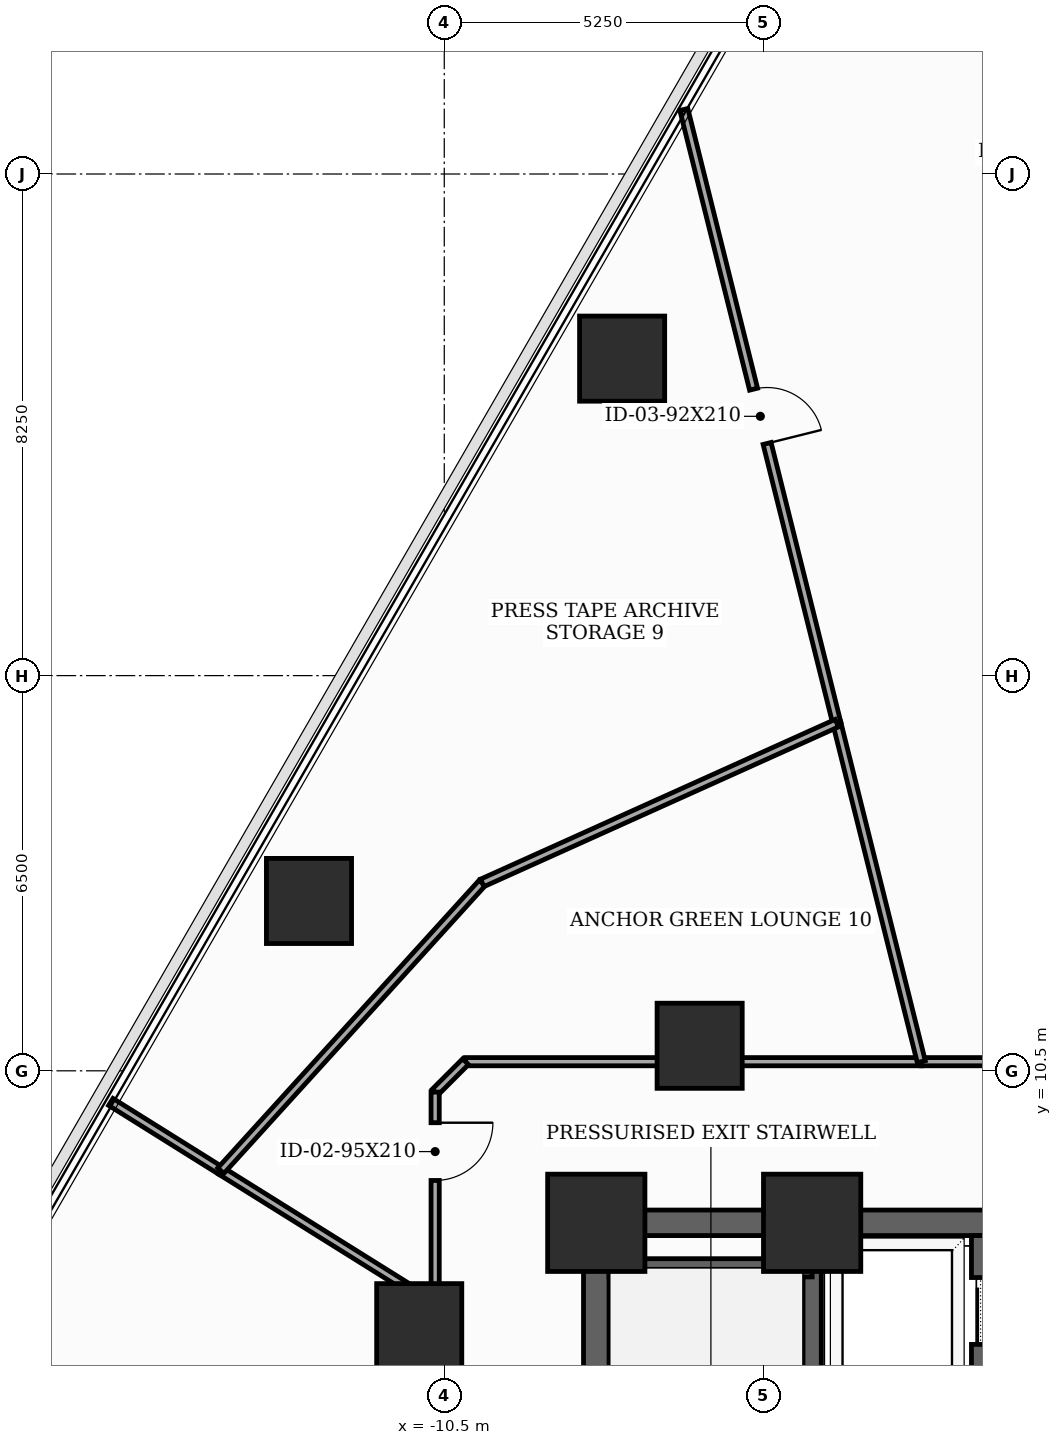
"""IFC4 building model, lengths in metres.
Left out: names, types, materials, properties, quantities, classifications, styles, units other than length and angle.
Written with IfcOpenShell. Run it as: python <this file> out.ifc"""

import sys

from ifc_helpers import new_model, si_unit, direction, frame, frame_2d, origin, origin_2d, place, context, subcontext, project, spatial, rectangle, extrude, element, fill, save


model = new_model("IFC4")
c1 = context("Model", 3, precision=1e-05, world=origin(), true_north=direction((0.0, 1.0)))
c2 = subcontext(c1, "Body", "Model", "MODEL_VIEW")
j1 = project(units=[si_unit("LENGTHUNIT", "METRE"), si_unit("PLANEANGLEUNIT", "RADIAN")], contexts=[c1])
p1 = place(None, origin())
s1 = spatial("IfcSite", under=j1, at=p1, CompositionType="ELEMENT")
p2 = place(p1, origin())
s2 = spatial("IfcBuilding", under=s1, at=p2, CompositionType="ELEMENT")
p3 = place(p2, frame((0.0, 0.0, 33.4)))
s3 = spatial("IfcBuildingStorey", under=s2, at=p3, CompositionType="ELEMENT", Elevation=33.4)
for number, where, z_axis, x_axis in (
    (1, (-4.45, 8.0, 0.0), (0.0, 0.0, 1.0), (1.0, 0.0, 0.0)),
    (2, (-8.0, 8.0, 0.0), (0.0, 0.0, 1.0), (1.0, 0.0, 0.0)),
):
    element("IfcColumn", number, at=place(p3, frame(where, z_axis=z_axis, x_axis=x_axis)), inside=s3, PredefinedType="COLUMN", context=c2, shape_type="SweptSolid", body=[
        extrude(rectangle(XDim=1.6, YDim=1.6, at=origin_2d()), origin(), (0.0, 0.0, 1.0), 3.7),
    ])
for number, where, z_axis, x_axis in (
    (3, (-6.3, 10.912, 0.0), (0.0, 0.0, 1.0), (1.0, 0.0, 0.0)),
    (4, (-10.912, 6.3, 0.0), (0.0, 0.0, 1.0), (1.0, 0.0, 0.0)),
    (5, (-7.575, 22.213, 0.0), (0.0, 0.0, 1.0), (1.0, 0.0, 0.0)),
    (6, (-12.725, 13.293, 0.0), (0.0, 0.0, 1.0), (1.0, 0.0, 0.0)),
):
    element("IfcColumn", number, at=place(p3, frame(where, z_axis=z_axis, x_axis=x_axis)), inside=s3, PredefinedType="COLUMN", context=c2, shape_type="SweptSolid", body=[
        extrude(rectangle(XDim=1.4, YDim=1.4, at=origin_2d()), origin(), (0.0, 0.0, 1.0), 3.7),
    ])
p4 = place(p3, frame((-8.0, -8.0, 0.0), z_axis=(0.0, 0.0, 1.0), x_axis=(0.0, 1.0, 0.0)))
e7 = element("IfcWall", 7, at=p4, inside=s3, PredefinedType="SHEAR", context=c2, shape_type="SweptSolid", body=[
    extrude(rectangle(XDim=16.0, YDim=0.42, at=frame_2d((8.0, 0.0))), origin(), (0.0, 0.0, 1.0), 3.5),
])
p5 = place(p4, frame((1.002, 0.0, 0.0)))
e8 = element("IfcOpeningElement", 8, at=p5, cuts=e7, PredefinedType="OPENING", context=c2, shape_type="SweptSolid", body=[
    extrude(rectangle(XDim=0.85, YDim=2.02, at=frame_2d((0.425, 1.01))), frame((0.0, 0.22, 0.0), z_axis=(0.0, -1.0, 0.0), x_axis=(1.0, 0.0, 0.0)), (0.0, 0.0, 1.0), 0.44),
])
p6 = place(p4, frame((5.35, 0.0, 0.0)))
e9 = element("IfcOpeningElement", 9, at=p6, cuts=e7, PredefinedType="OPENING", context=c2, shape_type="SweptSolid", body=[
    extrude(rectangle(XDim=1.05, YDim=2.15, at=frame_2d((0.525, 1.075))), frame((0.0, 0.22, 0.0), z_axis=(0.0, -1.0, 0.0), x_axis=(1.0, 0.0, 0.0)), (0.0, 0.0, 1.0), 0.44),
])
p7 = place(p3, frame((-8.0, 8.0, 0.0), z_axis=(0.0, 0.0, 1.0), x_axis=(1.0, 0.0, 0.0)))
e10 = element("IfcWall", 10, at=p7, inside=s3, PredefinedType="SHEAR", context=c2, shape_type="SweptSolid", body=[
    extrude(rectangle(XDim=16.0, YDim=0.42, at=frame_2d((8.0, 0.0))), origin(), (0.0, 0.0, 1.0), 3.5),
])
p8 = place(p7, frame((7.1, 0.0, 0.0)))
e11 = element("IfcOpeningElement", 11, at=p8, cuts=e10, PredefinedType="OPENING", context=c2, shape_type="SweptSolid", body=[
    extrude(rectangle(XDim=1.8, YDim=2.15, at=frame_2d((0.9, 1.075))), frame((0.0, 0.22, 0.0), z_axis=(0.0, -1.0, 0.0), x_axis=(1.0, 0.0, 0.0)), (0.0, 0.0, 1.0), 0.44),
])
p9 = place(p3, frame((-4.45, -7.79, 0.0), z_axis=(0.0, 0.0, 1.0), x_axis=(0.0, 1.0, 0.0)))
e12 = element("IfcWall", 12, at=p9, inside=s3, PredefinedType="SHEAR", context=c2, shape_type="SweptSolid", body=[
    extrude(rectangle(XDim=15.58, YDim=0.3, at=frame_2d((7.79, 0.0))), origin(), (0.0, 0.0, 1.0), 3.5),
])
p10 = place(p3, frame((-7.79, 7.26, 0.0), z_axis=(0.0, 0.0, 1.0), x_axis=(1.0, 0.0, 0.0)))
e13 = element("IfcWall", 13, at=p10, inside=s3, PredefinedType="SHEAR", context=c2, shape_type="SweptSolid", body=[
    extrude(rectangle(XDim=3.34, YDim=0.3, at=frame_2d((1.67, 0.0))), origin(), (0.0, 0.0, 1.0), 3.5),
])
p11 = place(p3, frame((-1.68, -4.85, 0.0), z_axis=(0.0, 0.0, 1.0), x_axis=(0.0, 1.0, 0.0)))
e14 = element("IfcWall", 14, at=p11, inside=s3, PredefinedType="SHEAR", context=c2, shape_type="SweptSolid", body=[
    extrude(rectangle(XDim=12.64, YDim=0.3, at=frame_2d((6.32, 0.0))), origin(), (0.0, 0.0, 1.0), 3.5),
])
p12 = place(p11, frame((3.95, 0.0, 0.0)))
e15 = element("IfcOpeningElement", 15, at=p12, cuts=e14, PredefinedType="OPENING", context=c2, shape_type="SweptSolid", body=[
    extrude(rectangle(XDim=1.1, YDim=2.1, at=frame_2d((0.55, 1.05))), frame((0.0, 0.16, 0.0), z_axis=(0.0, -1.0, 0.0), x_axis=(1.0, 0.0, 0.0)), (0.0, 0.0, 1.0), 0.32),
])
p13 = place(p11, frame((6.25, 0.0, 0.0)))
e16 = element("IfcOpeningElement", 16, at=p13, cuts=e14, PredefinedType="OPENING", context=c2, shape_type="SweptSolid", body=[
    extrude(rectangle(XDim=1.1, YDim=2.1, at=frame_2d((0.55, 1.05))), frame((0.0, 0.16, 0.0), z_axis=(0.0, -1.0, 0.0), x_axis=(1.0, 0.0, 0.0)), (0.0, 0.0, 1.0), 0.32),
])
p14 = place(p11, frame((8.55, 0.0, 0.0)))
e17 = element("IfcOpeningElement", 17, at=p14, cuts=e14, PredefinedType="OPENING", context=c2, shape_type="SweptSolid", body=[
    extrude(rectangle(XDim=1.1, YDim=2.1, at=frame_2d((0.55, 1.05))), frame((0.0, 0.16, 0.0), z_axis=(0.0, -1.0, 0.0), x_axis=(1.0, 0.0, 0.0)), (0.0, 0.0, 1.0), 0.32),
])
p15 = place(p11, frame((10.85, 0.0, 0.0)))
e18 = element("IfcOpeningElement", 18, at=p15, cuts=e14, PredefinedType="OPENING", context=c2, shape_type="SweptSolid", body=[
    extrude(rectangle(XDim=1.1, YDim=2.1, at=frame_2d((0.55, 1.05))), frame((0.0, 0.16, 0.0), z_axis=(0.0, -1.0, 0.0), x_axis=(1.0, 0.0, 0.0)), (0.0, 0.0, 1.0), 0.32),
])
p16 = place(p11, frame((0.45, 0.0, 0.0)))
e19 = element("IfcOpeningElement", 19, at=p16, cuts=e14, PredefinedType="OPENING", context=c2, shape_type="SweptSolid", body=[
    extrude(rectangle(XDim=0.85, YDim=2.02, at=frame_2d((0.425, 1.01))), frame((0.0, 0.16, 0.0), z_axis=(0.0, -1.0, 0.0), x_axis=(1.0, 0.0, 0.0)), (0.0, 0.0, 1.0), 0.32),
])
p17 = place(p11, frame((2.05, 0.0, 0.0)))
e20 = element("IfcOpeningElement", 20, at=p17, cuts=e14, PredefinedType="OPENING", context=c2, shape_type="SweptSolid", body=[
    extrude(rectangle(XDim=0.85, YDim=2.02, at=frame_2d((0.425, 1.01))), frame((0.0, 0.16, 0.0), z_axis=(0.0, -1.0, 0.0), x_axis=(1.0, 0.0, 0.0)), (0.0, 0.0, 1.0), 0.32),
])
p18 = place(p3, frame((1.715, 10.65, 0.0), z_axis=(0.0, 0.0, 1.0), x_axis=(-1.0, 0.0, 0.0)))
e21 = element("IfcWall", 21, at=p18, inside=s3, PredefinedType="PARTITIONING", context=c2, shape_type="SweptSolid", body=[
    extrude(rectangle(XDim=4.37, YDim=0.135, at=frame_2d((2.185, 0.0))), origin(), (0.0, 0.0, 1.0), 2.785),
])
p19 = place(p3, frame((-10.65, 6.655, 0.0), z_axis=(0.0, 0.0, 1.0), x_axis=(0.0, -1.0, 0.0)))
e22 = element("IfcWall", 22, at=p19, inside=s3, PredefinedType="PARTITIONING", context=c2, shape_type="SweptSolid", body=[
    extrude(rectangle(XDim=8.37, YDim=0.135, at=frame_2d((4.185, 0.0))), origin(), (0.0, 0.0, 1.0), 2.785),
])
p20 = place(p3, frame((-2.655, 10.65, 0.0), z_axis=(0.0, 0.0, 1.0), x_axis=(-1.0, 0.0, 0.0)))
e23 = element("IfcWall", 23, at=p20, inside=s3, PredefinedType="PARTITIONING", context=c2, shape_type="SweptSolid", body=[
    extrude(rectangle(XDim=7.495, YDim=0.135, at=frame_2d((3.748, 0.0))), origin(), (0.0, 0.0, 1.0), 2.685),
])
p21 = place(p3, frame((-10.15, 10.65, 0.0), z_axis=(0.0, 0.0, 1.0), x_axis=(-0.707106781187, -0.707106781187, 0.0)))
e24 = element("IfcWall", 24, at=p21, inside=s3, PredefinedType="PARTITIONING", context=c2, shape_type="SweptSolid", body=[
    extrude(rectangle(XDim=0.707, YDim=0.135, at=frame_2d((0.354, 0.0))), origin(), (0.0, 0.0, 1.0), 3.5),
])
p22 = place(p3, frame((-10.65, 10.15, 0.0), z_axis=(0.0, 0.0, 1.0), x_axis=(0.0, -1.0, 0.0)))
e25 = element("IfcWall", 25, at=p22, inside=s3, PredefinedType="PARTITIONING", context=c2, shape_type="SweptSolid", body=[
    extrude(rectangle(XDim=3.495, YDim=0.135, at=frame_2d((1.748, 0.0))), origin(), (0.0, 0.0, 1.0), 2.785),
])
p23 = place(p22, frame((0.504, 0.0, 0.0)))
e26 = element("IfcOpeningElement", 26, at=p23, cuts=e25, PredefinedType="OPENING", context=c2, shape_type="SweptSolid", body=[
    extrude(rectangle(XDim=0.95, YDim=2.1, at=frame_2d((0.475, 1.05))), frame((0.0, 0.077, 0.0), z_axis=(0.0, -1.0, 0.0), x_axis=(1.0, 0.0, 0.0)), (0.0, 0.0, 1.0), 0.155),
])
p24 = place(p3, frame((-6.56, 26.311, 0.0), z_axis=(0.0, 0.0, 1.0), x_axis=(0.241883926999, -0.970305192122, 0.0)))
e27 = element("IfcWall", 27, at=p24, inside=s3, PredefinedType="PARTITIONING", context=c2, shape_type="SweptSolid", body=[
    extrude(rectangle(XDim=10.402, YDim=0.135, at=frame_2d((5.201, 0.0))), origin(), (0.0, 0.0, 1.0), 2.935),
])
p25 = place(p24, frame((4.741, 0.0, 0.0)))
e28 = element("IfcOpeningElement", 28, at=p25, cuts=e27, PredefinedType="OPENING", context=c2, shape_type="SweptSolid", body=[
    extrude(rectangle(XDim=0.92, YDim=2.1, at=frame_2d((0.46, 1.05))), frame((0.0, 0.077, 0.0), z_axis=(0.0, -1.0, 0.0), x_axis=(1.0, 0.0, 0.0)), (0.0, 0.0, 1.0), 0.155),
])
p26 = place(p3, frame((-4.044, 16.218, 0.0), z_axis=(0.0, 0.0, 1.0), x_axis=(0.242025079774, -0.970269993744, 0.0)))
e29 = element("IfcWall", 29, at=p26, inside=s3, PredefinedType="PARTITIONING", context=c2, shape_type="SweptSolid", body=[
    extrude(rectangle(XDim=5.739, YDim=0.135, at=frame_2d((2.869, 0.0))), origin(), (0.0, 0.0, 1.0), 2.785),
])
p27 = place(p3, frame((-14.175, 8.857, 0.0), z_axis=(0.0, 0.0, 1.0), x_axis=(-0.847856855063, 0.530225191142, 0.0)))
e30 = element("IfcWall", 30, at=p27, inside=s3, PredefinedType="PARTITIONING", context=c2, shape_type="SweptSolid", body=[
    extrude(rectangle(XDim=2.134, YDim=0.135, at=frame_2d((1.067, 0.0))), origin(), (0.0, 0.0, 1.0), 2.935),
])
p28 = place(p3, frame((-10.65, 6.655, 0.0), z_axis=(0.0, 0.0, 1.0), x_axis=(-0.848140172493, 0.529771882798, 0.0)))
e31 = element("IfcWall", 31, at=p28, inside=s3, PredefinedType="PARTITIONING", context=c2, shape_type="SweptSolid", body=[
    extrude(rectangle(XDim=4.156, YDim=0.135, at=frame_2d((2.078, 0.0))), origin(), (0.0, 0.0, 1.0), 2.785),
])
for number, where, z_axis, x_axis in (
    (32, (-14.175, 8.857, 0.0), (0.0, 0.0, 1.0), (0.672, 0.74, 0.0)),
    (33, (-9.875, 13.591, 0.0), (0.0, 0.0, 1.0), (0.912, 0.411, 0.0)),
):
    element("IfcWall", number, at=place(p3, frame(where, z_axis=z_axis, x_axis=x_axis)), inside=s3, PredefinedType="PARTITIONING", context=c2, shape_type="SweptSolid", body=[
        extrude(rectangle(XDim=6.396, YDim=0.135, at=frame_2d((3.198, 0.0))), origin(), (0.0, 0.0, 1.0), 2.685),
    ])
p29 = place(p15, origin())
e34 = element("IfcDoor", 34, at=p29, inside=s3, OperationType="SLIDING_TO_LEFT", PredefinedType="DOOR", context=c2, shape_type="SweptSolid", body=[
    extrude(rectangle(XDim=1.1, YDim=2.1, at=frame_2d((0.55, 1.05))), frame((0.0, 0.025, 0.0), z_axis=(0.0, -1.0, 0.0), x_axis=(1.0, 0.0, 0.0)), (0.0, 0.0, 1.0), 0.05),
])
fill(e18, e34)
p30 = place(p23, origin())
e35 = element("IfcDoor", 35, at=p30, inside=s3, OperationType="SINGLE_SWING_LEFT", PredefinedType="DOOR", context=c2, shape_type="SweptSolid", body=[
    extrude(rectangle(XDim=0.95, YDim=2.1, at=frame_2d((0.475, 1.05))), frame((0.0, 0.025, 0.0), z_axis=(0.0, -1.0, 0.0), x_axis=(1.0, 0.0, 0.0)), (0.0, 0.0, 1.0), 0.05),
])
fill(e26, e35)
p31 = place(p25, origin())
e36 = element("IfcDoor", 36, at=p31, inside=s3, OperationType="SINGLE_SWING_RIGHT", PredefinedType="DOOR", context=c2, shape_type="SweptSolid", body=[
    extrude(rectangle(XDim=0.92, YDim=2.1, at=frame_2d((0.46, 1.05))), frame((0.0, 0.025, 0.0), z_axis=(0.0, -1.0, 0.0), x_axis=(1.0, 0.0, 0.0)), (0.0, 0.0, 1.0), 0.05),
])
fill(e28, e36)
save(model, sys.argv[1])
